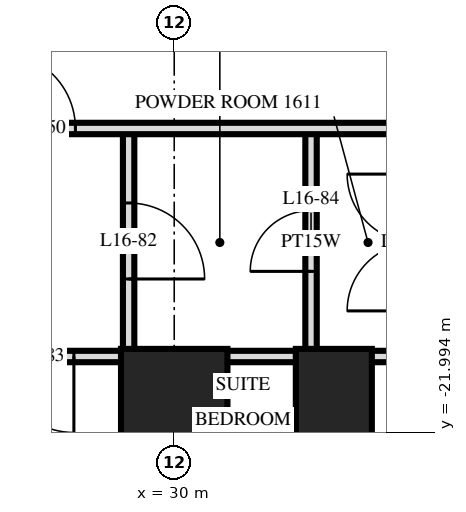
"""IFC4 building model, lengths in metres.
Left out: names, types, materials, properties, quantities, classifications, styles, units other than length and angle.
Written with IfcOpenShell. Run it as: python <this file> out.ifc"""

import sys

from ifc_helpers import new_model, si_unit, direction, frame, frame_2d, origin, origin_2d, place, context, subcontext, project, spatial, rectangle, extrude, element, fill, save


model = new_model("IFC4")
c1 = context("Model", 3, precision=1e-05, world=origin(), true_north=direction((0.0, 1.0)))
c2 = subcontext(c1, "Body", "Model", "MODEL_VIEW")
j1 = project(units=[si_unit("LENGTHUNIT", "METRE"), si_unit("PLANEANGLEUNIT", "RADIAN")], contexts=[c1])
p1 = place(None, origin())
s1 = spatial("IfcSite", under=j1, at=p1, CompositionType="ELEMENT")
p2 = place(p1, origin())
s2 = spatial("IfcBuilding", under=s1, at=p2, CompositionType="ELEMENT")
p3 = place(p2, frame((0.0, 0.0, 67.2)))
s3 = spatial("IfcBuildingStorey", under=s2, at=p3, CompositionType="ELEMENT", Elevation=67.2)
p4 = place(p3, frame((30.0, -21.6, 0.0), z_axis=(0.0, 0.0, 1.0), x_axis=(1.0, 0.0, 0.0)))
e1 = element("IfcColumn", 1, at=p4, inside=s3, PredefinedType="COLUMN", context=c2, shape_type="SweptSolid", body=[
    extrude(rectangle(XDim=1.4, YDim=1.4, at=origin_2d()), origin(), (0.0, 0.0, 1.0), 3.6),
])
p5 = place(p3, frame((32.1, -21.6, 0.0), z_axis=(0.0, 0.0, 1.0), x_axis=(0.0, 1.0, 0.0)))
e2 = element("IfcColumn", 2, at=p5, inside=s3, PredefinedType="COLUMN", context=c2, shape_type="SweptSolid", body=[
    extrude(rectangle(XDim=1.4, YDim=1.0, at=origin_2d()), origin(), (0.0, 0.0, 1.0), 3.6),
])
p6 = place(p3, frame((31.8, -21.0, 0.0), z_axis=(0.0, 0.0, 1.0), x_axis=(0.0, 1.0, 0.0)))
e3 = element("IfcWall", 3, at=p6, inside=s3, PredefinedType="PLUMBINGWALL", context=c2, shape_type="SweptSolid", body=[
    extrude(rectangle(XDim=3.0, YDim=0.15, at=frame_2d((1.5, 0.0))), origin(), (0.0, 0.0, 1.0), 3.32),
])
p7 = place(p6, frame((1.12, 0.0, 0.0)))
e4 = element("IfcOpeningElement", 4, at=p7, cuts=e3, PredefinedType="OPENING", context=c2, shape_type="SweptSolid", body=[
    extrude(rectangle(XDim=0.8, YDim=2.1, at=frame_2d((0.4, 1.05))), frame((0.0, 0.085, 0.0), z_axis=(0.0, -1.0, 0.0), x_axis=(1.0, 0.0, 0.0)), (0.0, 0.0, 1.0), 0.17),
])
p8 = place(p3, frame((30.0, -28.978, 0.0), z_axis=(0.0, 0.0, 1.0), x_axis=(0.0, 1.0, 0.0)))
e5 = element("IfcWall", 5, at=p8, inside=s3, PredefinedType="PARTITIONING", context=c2, shape_type="SweptSolid", body=[
    extrude(rectangle(XDim=7.978, YDim=0.15, at=frame_2d((3.989, 0.0))), origin(), (0.0, 0.0, 1.0), 3.32),
])
p9 = place(p8, frame((3.458, 0.0, 0.0)))
e6 = element("IfcOpeningElement", 6, at=p9, cuts=e5, PredefinedType="OPENING", context=c2, shape_type="SweptSolid", body=[
    extrude(rectangle(XDim=0.9, YDim=2.1, at=frame_2d((0.45, 1.05))), frame((0.0, 0.085, 0.0), z_axis=(0.0, -1.0, 0.0), x_axis=(1.0, 0.0, 0.0)), (0.0, 0.0, 1.0), 0.17),
])
p10 = place(p3, frame((29.4, -21.0, 0.0), z_axis=(0.0, 0.0, 1.0), x_axis=(0.0, 1.0, 0.0)))
e7 = element("IfcWall", 7, at=p10, inside=s3, PredefinedType="PARTITIONING", context=c2, shape_type="SweptSolid", body=[
    extrude(rectangle(XDim=3.0, YDim=0.15, at=frame_2d((1.5, 0.0))), origin(), (0.0, 0.0, 1.0), 3.32),
])
p11 = place(p10, frame((1.02, 0.0, 0.0)))
e8 = element("IfcOpeningElement", 8, at=p11, cuts=e7, PredefinedType="OPENING", context=c2, shape_type="SweptSolid", body=[
    extrude(rectangle(XDim=1.0, YDim=2.1, at=frame_2d((0.5, 1.05))), frame((0.0, 0.085, 0.0), z_axis=(0.0, -1.0, 0.0), x_axis=(1.0, 0.0, 0.0)), (0.0, 0.0, 1.0), 0.17),
])
p12 = place(p3, frame((27.0, -21.0, 0.0), z_axis=(0.0, 0.0, 1.0), x_axis=(1.0, 0.0, 0.0)))
e9 = element("IfcWall", 9, at=p12, inside=s3, PredefinedType="PARTITIONING", context=c2, shape_type="SweptSolid", body=[
    extrude(rectangle(XDim=2.4, YDim=0.15, at=frame_2d((1.2, 0.0))), origin(), (0.0, 0.0, 1.0), 3.32),
])
p13 = place(p12, frame((0.68, 0.0, 0.0)))
e10 = element("IfcOpeningElement", 10, at=p13, cuts=e9, PredefinedType="OPENING", context=c2, shape_type="SweptSolid", body=[
    extrude(rectangle(XDim=1.0, YDim=2.1, at=frame_2d((0.5, 1.05))), frame((0.0, 0.085, 0.0), z_axis=(0.0, -1.0, 0.0), x_axis=(1.0, 0.0, 0.0)), (0.0, 0.0, 1.0), 0.17),
])
p14 = place(p3, frame((29.4, -21.0, 0.0), z_axis=(0.0, 0.0, 1.0), x_axis=(1.0, 0.0, 0.0)))
e11 = element("IfcWall", 11, at=p14, inside=s3, PredefinedType="PARTITIONING", context=c2, shape_type="SweptSolid", body=[
    extrude(rectangle(XDim=2.4, YDim=0.15, at=frame_2d((1.2, 0.0))), origin(), (0.0, 0.0, 1.0), 3.32),
])
p15 = place(p3, frame((31.8, -21.0, 0.0), z_axis=(0.0, 0.0, 1.0), x_axis=(1.0, 0.0, 0.0)))
e12 = element("IfcWall", 12, at=p15, inside=s3, PredefinedType="PLUMBINGWALL", context=c2, shape_type="SweptSolid", body=[
    extrude(rectangle(XDim=1.32, YDim=0.15, at=frame_2d((0.66, 0.0))), origin(), (0.0, 0.0, 1.0), 3.32),
])
p16 = place(p3, frame((-33.12, -18.0, 0.0), z_axis=(0.0, 0.0, 1.0), x_axis=(1.0, 0.0, 0.0)))
e13 = element("IfcWall", 13, at=p16, inside=s3, PredefinedType="PARTITIONING", context=c2, shape_type="SweptSolid", body=[
    extrude(rectangle(XDim=66.24, YDim=0.15, at=frame_2d((33.12, 0.0))), origin(), (0.0, 0.0, 1.0), 3.32),
])
p17 = place(p16, frame((15.27, 0.0, 0.0)))
e14 = element("IfcOpeningElement", 14, at=p17, cuts=e13, PredefinedType="OPENING", context=c2, shape_type="SweptSolid", body=[
    extrude(rectangle(XDim=1.0, YDim=2.1, at=frame_2d((0.5, 1.05))), frame((0.0, 0.085, 0.0), z_axis=(0.0, -1.0, 0.0), x_axis=(1.0, 0.0, 0.0)), (0.0, 0.0, 1.0), 0.17),
])
p18 = place(p16, frame((21.22, 0.0, 0.0)))
e15 = element("IfcOpeningElement", 15, at=p18, cuts=e13, PredefinedType="OPENING", context=c2, shape_type="SweptSolid", body=[
    extrude(rectangle(XDim=1.0, YDim=2.1, at=frame_2d((0.5, 1.05))), frame((0.0, 0.085, 0.0), z_axis=(0.0, -1.0, 0.0), x_axis=(1.0, 0.0, 0.0)), (0.0, 0.0, 1.0), 0.17),
])
p19 = place(p16, frame((24.27, 0.0, 0.0)))
e16 = element("IfcOpeningElement", 16, at=p19, cuts=e13, PredefinedType="OPENING", context=c2, shape_type="SweptSolid", body=[
    extrude(rectangle(XDim=1.0, YDim=2.1, at=frame_2d((0.5, 1.05))), frame((0.0, 0.085, 0.0), z_axis=(0.0, -1.0, 0.0), x_axis=(1.0, 0.0, 0.0)), (0.0, 0.0, 1.0), 0.17),
])
p20 = place(p16, frame((30.97, 0.0, 0.0)))
e17 = element("IfcOpeningElement", 17, at=p20, cuts=e13, PredefinedType="OPENING", context=c2, shape_type="SweptSolid", body=[
    extrude(rectangle(XDim=1.0, YDim=2.1, at=frame_2d((0.5, 1.05))), frame((0.0, 0.085, 0.0), z_axis=(0.0, -1.0, 0.0), x_axis=(1.0, 0.0, 0.0)), (0.0, 0.0, 1.0), 0.17),
])
p21 = place(p16, frame((40.42, 0.0, 0.0)))
e18 = element("IfcOpeningElement", 18, at=p21, cuts=e13, PredefinedType="OPENING", context=c2, shape_type="SweptSolid", body=[
    extrude(rectangle(XDim=1.0, YDim=2.1, at=frame_2d((0.5, 1.05))), frame((0.0, 0.085, 0.0), z_axis=(0.0, -1.0, 0.0), x_axis=(1.0, 0.0, 0.0)), (0.0, 0.0, 1.0), 0.17),
])
p22 = place(p16, frame((43.97, 0.0, 0.0)))
e19 = element("IfcOpeningElement", 19, at=p22, cuts=e13, PredefinedType="OPENING", context=c2, shape_type="SweptSolid", body=[
    extrude(rectangle(XDim=1.0, YDim=2.1, at=frame_2d((0.5, 1.05))), frame((0.0, 0.085, 0.0), z_axis=(0.0, -1.0, 0.0), x_axis=(1.0, 0.0, 0.0)), (0.0, 0.0, 1.0), 0.17),
])
p23 = place(p16, frame((45.52, 0.0, 0.0)))
e20 = element("IfcOpeningElement", 20, at=p23, cuts=e13, PredefinedType="OPENING", context=c2, shape_type="SweptSolid", body=[
    extrude(rectangle(XDim=1.0, YDim=2.1, at=frame_2d((0.5, 1.05))), frame((0.0, 0.085, 0.0), z_axis=(0.0, -1.0, 0.0), x_axis=(1.0, 0.0, 0.0)), (0.0, 0.0, 1.0), 0.17),
])
p24 = place(p16, frame((52.97, 0.0, 0.0)))
e21 = element("IfcOpeningElement", 21, at=p24, cuts=e13, PredefinedType="OPENING", context=c2, shape_type="SweptSolid", body=[
    extrude(rectangle(XDim=1.0, YDim=2.1, at=frame_2d((0.5, 1.05))), frame((0.0, 0.085, 0.0), z_axis=(0.0, -1.0, 0.0), x_axis=(1.0, 0.0, 0.0)), (0.0, 0.0, 1.0), 0.17),
])
p25 = place(p16, frame((54.27, 0.0, 0.0)))
e22 = element("IfcOpeningElement", 22, at=p25, cuts=e13, PredefinedType="OPENING", context=c2, shape_type="SweptSolid", body=[
    extrude(rectangle(XDim=1.0, YDim=2.1, at=frame_2d((0.5, 1.05))), frame((0.0, 0.085, 0.0), z_axis=(0.0, -1.0, 0.0), x_axis=(1.0, 0.0, 0.0)), (0.0, 0.0, 1.0), 0.17),
])
p26 = place(p16, frame((13.42, 0.0, 0.0)))
e23 = element("IfcOpeningElement", 23, at=p26, cuts=e13, PredefinedType="OPENING", context=c2, shape_type="SweptSolid", body=[
    extrude(rectangle(XDim=1.0, YDim=2.1, at=frame_2d((0.5, 1.05))), frame((0.0, 0.085, 0.0), z_axis=(0.0, -1.0, 0.0), x_axis=(1.0, 0.0, 0.0)), (0.0, 0.0, 1.0), 0.17),
])
p27 = place(p16, frame((60.82, 0.0, 0.0)))
e24 = element("IfcOpeningElement", 24, at=p27, cuts=e13, PredefinedType="OPENING", context=c2, shape_type="SweptSolid", body=[
    extrude(rectangle(XDim=1.0, YDim=2.1, at=frame_2d((0.5, 1.05))), frame((0.0, 0.085, 0.0), z_axis=(0.0, -1.0, 0.0), x_axis=(1.0, 0.0, 0.0)), (0.0, 0.0, 1.0), 0.17),
])
p28 = place(p27, origin())
e25 = element("IfcDoor", 25, at=p28, inside=s3, OperationType="SINGLE_SWING_RIGHT", PredefinedType="DOOR", context=c2, shape_type="SweptSolid", body=[
    extrude(rectangle(XDim=1.0, YDim=2.1, at=frame_2d((0.5, 1.05))), frame((0.0, 0.025, 0.0), z_axis=(0.0, -1.0, 0.0), x_axis=(1.0, 0.0, 0.0)), (0.0, 0.0, 1.0), 0.05),
])
fill(e24, e25)
p29 = place(p11, frame((0.5, 0.0, 0.0), z_axis=(0.0, 0.0, 1.0), x_axis=(-1.0, 0.0, 0.0)))
e26 = element("IfcDoor", 26, at=p29, inside=s3, OperationType="SINGLE_SWING_LEFT", PredefinedType="DOOR", context=c2, shape_type="SweptSolid", body=[
    extrude(rectangle(XDim=1.0, YDim=2.1, at=frame_2d((0.0, 1.05))), frame((0.0, -0.025, 0.0), z_axis=(0.0, 1.0, 0.0), x_axis=(-1.0, 0.0, 0.0)), (0.0, 0.0, 1.0), 0.05),
])
fill(e8, e26)
p30 = place(p13, frame((0.5, 0.0, 0.0), z_axis=(0.0, 0.0, 1.0), x_axis=(-1.0, 0.0, 0.0)))
e27 = element("IfcDoor", 27, at=p30, inside=s3, OperationType="SINGLE_SWING_RIGHT", PredefinedType="DOOR", context=c2, shape_type="SweptSolid", body=[
    extrude(rectangle(XDim=1.0, YDim=2.1, at=frame_2d((0.0, 1.05))), frame((0.0, -0.025, 0.0), z_axis=(0.0, 1.0, 0.0), x_axis=(-1.0, 0.0, 0.0)), (0.0, 0.0, 1.0), 0.05),
])
fill(e10, e27)
p31 = place(p7, origin())
e28 = element("IfcDoor", 28, at=p31, inside=s3, OperationType="SINGLE_SWING_RIGHT", PredefinedType="DOOR", context=c2, shape_type="SweptSolid", body=[
    extrude(rectangle(XDim=0.8, YDim=2.1, at=frame_2d((0.4, 1.05))), frame((0.0, 0.025, 0.0), z_axis=(0.0, -1.0, 0.0), x_axis=(1.0, 0.0, 0.0)), (0.0, 0.0, 1.0), 0.05),
])
fill(e4, e28)
save(model, sys.argv[1])
